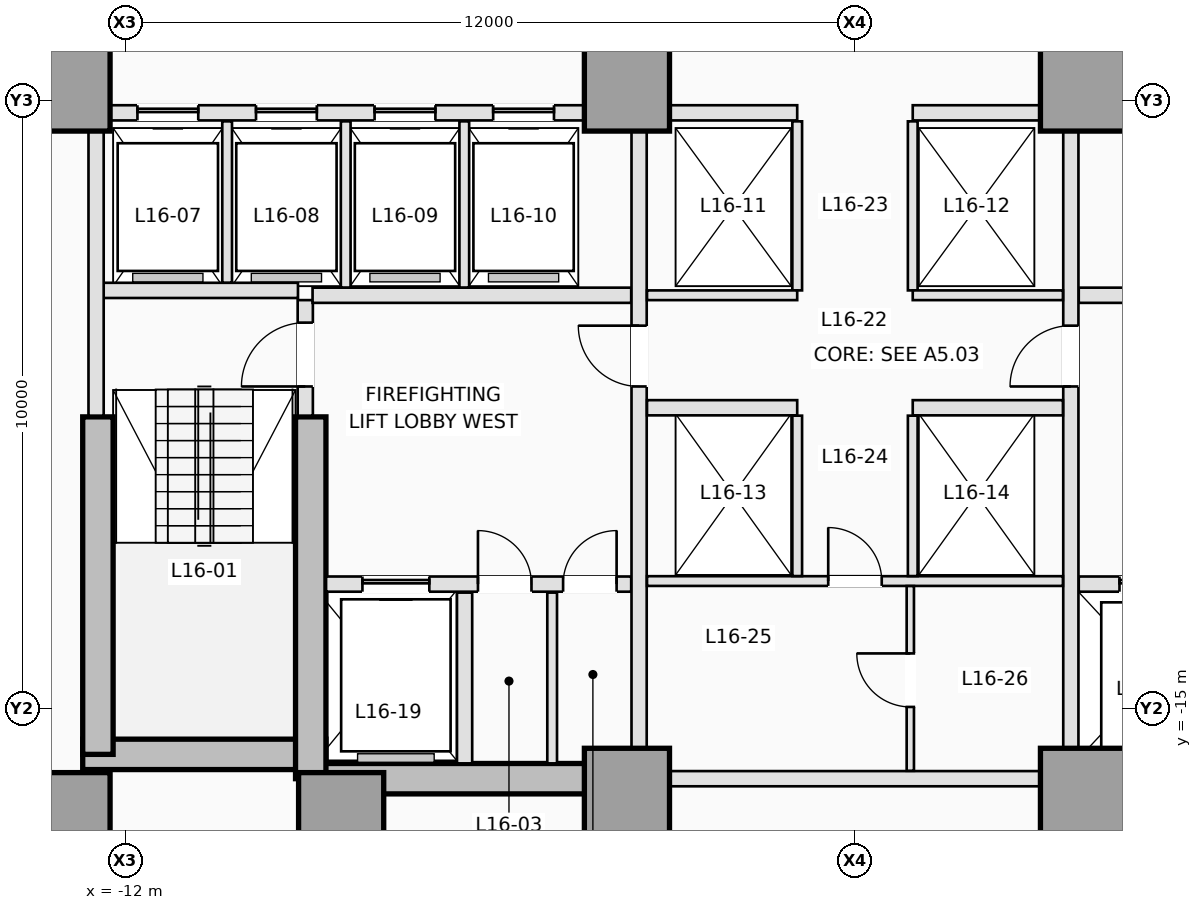
"""IFC4 building model, lengths in metres.
Left out: names, types, materials, properties, quantities, classifications, styles, units other than length and angle.
Written with IfcOpenShell. Run it as: python <this file> out.ifc"""

import sys

from ifc_helpers import new_model, si_unit, direction, frame, frame_2d, origin, origin_2d, place, context, subcontext, project, spatial, rectangle, extrude, element, fill, save


model = new_model("IFC4")
c1 = context("Model", 3, precision=1e-05, world=origin(), true_north=direction((0.0, 1.0)))
c2 = subcontext(c1, "Body", "Model", "MODEL_VIEW")
j1 = project(units=[si_unit("LENGTHUNIT", "METRE"), si_unit("PLANEANGLEUNIT", "RADIAN")], contexts=[c1])
p1 = place(None, origin())
s1 = spatial("IfcSite", under=j1, at=p1, CompositionType="ELEMENT")
p2 = place(p1, origin())
s2 = spatial("IfcBuilding", under=s1, at=p2, CompositionType="ELEMENT")
p3 = place(p2, frame((0.0, 0.0, 62.6)))
s3 = spatial("IfcBuildingStorey", under=s2, at=p3, CompositionType="ELEMENT", Elevation=62.6)
p4 = place(p3, frame((-12.7, -15.75, 0.0), z_axis=(0.0, 0.0, 1.0), x_axis=(1.0, 0.0, 0.0)))
e1 = element("IfcWall", 1, at=p4, inside=s3, PredefinedType="SHEAR", context=c2, shape_type="SweptSolid", body=[
    extrude(rectangle(XDim=4.0, YDim=0.5, at=frame_2d((2.0, 0.0))), origin(), (0.0, 0.0, 1.0), 3.5),
])
for number, where, z_axis, x_axis in (
    (2, (-8.95, -16.15, 0.0), (0.0, 0.0, 1.0), (1.0, 0.0, 0.0)),
    (3, (3.75, -16.15, 0.0), (0.0, 0.0, 1.0), (1.0, 0.0, 0.0)),
):
    element("IfcWall", number, at=place(p3, frame(where, z_axis=z_axis, x_axis=x_axis)), inside=s3, PredefinedType="SHEAR", context=c2, shape_type="SweptSolid", body=[
        extrude(rectangle(XDim=5.2, YDim=0.5, at=frame_2d((2.6, 0.0))), origin(), (0.0, 0.0, 1.0), 3.5),
    ])
p5 = place(p3, frame((-12.45, -15.75, 0.0), z_axis=(0.0, 0.0, 1.0), x_axis=(0.0, 1.0, 0.0)))
e4 = element("IfcWall", 4, at=p5, inside=s3, PredefinedType="SHEAR", context=c2, shape_type="SweptSolid", body=[
    extrude(rectangle(XDim=5.55, YDim=0.5, at=frame_2d((2.775, 0.0))), origin(), (0.0, 0.0, 1.0), 3.5),
])
p6 = place(p3, frame((-8.95, -16.15, 0.0), z_axis=(0.0, 0.0, 1.0), x_axis=(0.0, 1.0, 0.0)))
e5 = element("IfcWall", 5, at=p6, inside=s3, PredefinedType="SHEAR", context=c2, shape_type="SweptSolid", body=[
    extrude(rectangle(XDim=5.95, YDim=0.5, at=frame_2d((2.975, 0.0))), origin(), (0.0, 0.0, 1.0), 3.5),
])
for number, where, z_axis, x_axis in (
    (6, (-12.95, -16.75, 0.0), (0.0, 0.0, 1.0), (1.0, 0.0, 0.0)),
    (7, (-8.45, -16.75, 0.0), (0.0, 0.0, 1.0), (1.0, 0.0, 0.0)),
    (8, (-3.75, -16.35, 0.0), (0.0, 0.0, 1.0), (1.0, 0.0, 0.0)),
    (9, (3.75, -16.35, 0.0), (0.0, 0.0, 1.0), (1.0, 0.0, 0.0)),
    (10, (-12.95, -4.8, 0.0), (0.0, 0.0, 1.0), (1.0, 0.0, 0.0)),
    (11, (-3.75, -4.8, 0.0), (0.0, 0.0, 1.0), (1.0, 0.0, 0.0)),
    (12, (3.75, -4.8, 0.0), (0.0, 0.0, 1.0), (1.0, 0.0, 0.0)),
):
    element("IfcColumn", number, at=place(p3, frame(where, z_axis=z_axis, x_axis=x_axis)), inside=s3, PredefinedType="COLUMN", context=c2, shape_type="SweptSolid", body=[
        extrude(rectangle(XDim=1.4, YDim=1.4, at=origin_2d()), origin(), (0.0, 0.0, 1.0), 3.5),
    ])
p7 = place(p3, frame((-9.04, -10.18, 0.0), z_axis=(0.0, 0.0, 1.0), x_axis=(0.0, 1.0, 0.0)))
e13 = element("IfcWall", 13, at=p7, inside=s3, PredefinedType="PARTITIONING", context=c2, shape_type="SweptSolid", body=[
    extrude(rectangle(XDim=1.9, YDim=0.25, at=frame_2d((0.95, 0.0))), origin(), (0.0, 0.0, 1.0), 3.25),
])
p8 = place(p7, frame((0.48, 0.0, 0.0)))
e14 = element("IfcOpeningElement", 14, at=p8, cuts=e13, PredefinedType="OPENING", context=c2, shape_type="SweptSolid", body=[
    extrude(rectangle(XDim=1.05, YDim=2.15, at=frame_2d((0.525, 1.075))), frame((0.0, 0.135, 0.0), z_axis=(0.0, -1.0, 0.0), x_axis=(1.0, 0.0, 0.0)), (0.0, 0.0, 1.0), 0.27),
])
p9 = place(p3, frame((-12.38, -8.12, 0.0), z_axis=(0.0, 0.0, 1.0), x_axis=(1.0, 0.0, 0.0)))
e15 = element("IfcWall", 15, at=p9, inside=s3, PredefinedType="PARTITIONING", context=c2, shape_type="SweptSolid", body=[
    extrude(rectangle(XDim=3.22, YDim=0.25, at=frame_2d((1.61, 0.0))), origin(), (0.0, 0.0, 1.0), 3.25),
])
p10 = place(p3, frame((-12.48, -10.18, 0.0), z_axis=(0.0, 0.0, 1.0), x_axis=(0.0, 1.0, 0.0)))
e16 = element("IfcWall", 16, at=p10, inside=s3, PredefinedType="PARTITIONING", context=c2, shape_type="SweptSolid", body=[
    extrude(rectangle(XDim=4.678, YDim=0.25, at=frame_2d((2.339, 0.0))), origin(), (0.0, 0.0, 1.0), 3.25),
])
p11 = place(p3, frame((-8.698, -12.95, 0.0), z_axis=(0.0, 0.0, 1.0), x_axis=(1.0, 0.0, 0.0)))
e17 = element("IfcWall", 17, at=p11, inside=s3, PredefinedType="PARTITIONING", context=c2, shape_type="SweptSolid", body=[
    extrude(rectangle(XDim=5.018, YDim=0.25, at=frame_2d((2.509, 0.0))), origin(), (0.0, 0.0, 1.0), 3.25),
])
p12 = place(p11, frame((0.598, 0.0, 0.0)))
e18 = element("IfcOpeningElement", 18, at=p12, cuts=e17, PredefinedType="OPENING", context=c2, shape_type="SweptSolid", body=[
    extrude(rectangle(XDim=1.1, YDim=2.15, at=frame_2d((0.55, 1.075))), frame((0.0, 0.135, 0.0), z_axis=(0.0, -1.0, 0.0), x_axis=(1.0, 0.0, 0.0)), (0.0, 0.0, 1.0), 0.27),
])
p13 = place(p11, frame((2.498, 0.0, 0.0)))
e19 = element("IfcOpeningElement", 19, at=p13, cuts=e17, PredefinedType="OPENING", context=c2, shape_type="SweptSolid", body=[
    extrude(rectangle(XDim=0.88, YDim=2.1, at=frame_2d((0.44, 1.05))), frame((0.0, 0.135, 0.0), z_axis=(0.0, -1.0, 0.0), x_axis=(1.0, 0.0, 0.0)), (0.0, 0.0, 1.0), 0.27),
])
p14 = place(p11, frame((3.898, 0.0, 0.0)))
e20 = element("IfcOpeningElement", 20, at=p14, cuts=e17, PredefinedType="OPENING", context=c2, shape_type="SweptSolid", body=[
    extrude(rectangle(XDim=0.88, YDim=2.1, at=frame_2d((0.44, 1.05))), frame((0.0, 0.135, 0.0), z_axis=(0.0, -1.0, 0.0), x_axis=(1.0, 0.0, 0.0)), (0.0, 0.0, 1.0), 0.27),
])
p15 = place(p3, frame((3.68, -12.95, 0.0), z_axis=(0.0, 0.0, 1.0), x_axis=(1.0, 0.0, 0.0)))
e21 = element("IfcWall", 21, at=p15, inside=s3, PredefinedType="PARTITIONING", context=c2, shape_type="SweptSolid", body=[
    extrude(rectangle(XDim=5.018, YDim=0.25, at=frame_2d((2.509, 0.0))), origin(), (0.0, 0.0, 1.0), 3.25),
])
p16 = place(p15, frame((3.32, 0.0, 0.0)))
e22 = element("IfcOpeningElement", 22, at=p16, cuts=e21, PredefinedType="OPENING", context=c2, shape_type="SweptSolid", body=[
    extrude(rectangle(XDim=1.1, YDim=2.15, at=frame_2d((0.55, 1.075))), frame((0.0, 0.135, 0.0), z_axis=(0.0, -1.0, 0.0), x_axis=(1.0, 0.0, 0.0)), (0.0, 0.0, 1.0), 0.27),
])
p17 = place(p15, frame((0.67, 0.0, 0.0)))
e23 = element("IfcOpeningElement", 23, at=p17, cuts=e21, PredefinedType="OPENING", context=c2, shape_type="SweptSolid", body=[
    extrude(rectangle(XDim=1.2, YDim=2.15, at=frame_2d((0.6, 1.075))), frame((0.0, 0.135, 0.0), z_axis=(0.0, -1.0, 0.0), x_axis=(1.0, 0.0, 0.0)), (0.0, 0.0, 1.0), 0.27),
])
p18 = place(p3, frame((-6.42, -15.898, 0.0), z_axis=(0.0, 0.0, 1.0), x_axis=(0.0, 1.0, 0.0)))
e24 = element("IfcWall", 24, at=p18, inside=s3, PredefinedType="PARTITIONING", context=c2, shape_type="SweptSolid", body=[
    extrude(rectangle(XDim=2.808, YDim=0.25, at=frame_2d((1.404, 0.0))), origin(), (0.0, 0.0, 1.0), 3.25),
])
p19 = place(p3, frame((-4.98, -15.898, 0.0), z_axis=(0.0, 0.0, 1.0), x_axis=(0.0, 1.0, 0.0)))
e25 = element("IfcWall", 25, at=p19, inside=s3, PredefinedType="PARTITIONING", context=c2, shape_type="SweptSolid", body=[
    extrude(rectangle(XDim=2.808, YDim=0.16, at=frame_2d((1.404, 0.0))), origin(), (0.0, 0.0, 1.0), 3.25),
])
for number, where, z_axis, x_axis in (
    (26, (-8.92, -8.2, 0.0), (0.0, 0.0, 1.0), (1.0, 0.0, 0.0)),
    (27, (3.68, -8.2, 0.0), (0.0, 0.0, 1.0), (1.0, 0.0, 0.0)),
):
    element("IfcWall", number, at=place(p3, frame(where, z_axis=z_axis, x_axis=x_axis)), inside=s3, PredefinedType="PARTITIONING", context=c2, shape_type="SweptSolid", body=[
        extrude(rectangle(XDim=5.24, YDim=0.25, at=frame_2d((2.62, 0.0))), origin(), (0.0, 0.0, 1.0), 3.25),
    ])
p20 = place(p3, frame((-3.55, -15.648, 0.0), z_axis=(0.0, 0.0, 1.0), x_axis=(0.0, 1.0, 0.0)))
e28 = element("IfcWall", 28, at=p20, inside=s3, PredefinedType="PARTITIONING", context=c2, shape_type="SweptSolid", body=[
    extrude(rectangle(XDim=10.146, YDim=0.25, at=frame_2d((5.073, 0.0))), origin(), (0.0, 0.0, 1.0), 3.25),
])
p21 = place(p20, frame((5.948, 0.0, 0.0)))
e29 = element("IfcOpeningElement", 29, at=p21, cuts=e28, PredefinedType="OPENING", context=c2, shape_type="SweptSolid", body=[
    extrude(rectangle(XDim=1.0, YDim=2.15, at=frame_2d((0.5, 1.075))), frame((0.0, 0.135, 0.0), z_axis=(0.0, -1.0, 0.0), x_axis=(1.0, 0.0, 0.0)), (0.0, 0.0, 1.0), 0.27),
])
p22 = place(p3, frame((3.55, -15.648, 0.0), z_axis=(0.0, 0.0, 1.0), x_axis=(0.0, 1.0, 0.0)))
e30 = element("IfcWall", 30, at=p22, inside=s3, PredefinedType="PARTITIONING", context=c2, shape_type="SweptSolid", body=[
    extrude(rectangle(XDim=10.146, YDim=0.25, at=frame_2d((5.073, 0.0))), origin(), (0.0, 0.0, 1.0), 3.25),
])
p23 = place(p22, frame((5.948, 0.0, 0.0)))
e31 = element("IfcOpeningElement", 31, at=p23, cuts=e30, PredefinedType="OPENING", context=c2, shape_type="SweptSolid", body=[
    extrude(rectangle(XDim=1.0, YDim=2.15, at=frame_2d((0.5, 1.075))), frame((0.0, 0.135, 0.0), z_axis=(0.0, -1.0, 0.0), x_axis=(1.0, 0.0, 0.0)), (0.0, 0.0, 1.0), 0.27),
])
p24 = place(p3, frame((-12.248, -5.2, 0.0), z_axis=(0.0, 0.0, 1.0), x_axis=(1.0, 0.0, 0.0)))
e32 = element("IfcWall", 32, at=p24, inside=s3, PredefinedType="PARTITIONING", context=c2, shape_type="SweptSolid", body=[
    extrude(rectangle(XDim=7.796, YDim=0.25, at=frame_2d((3.898, 0.0))), origin(), (0.0, 0.0, 1.0), 3.25),
])
p25 = place(p24, frame((0.448, 0.0, 0.0)))
e33 = element("IfcOpeningElement", 33, at=p25, cuts=e32, PredefinedType="OPENING", context=c2, shape_type="SweptSolid", body=[
    extrude(rectangle(XDim=1.0, YDim=2.15, at=frame_2d((0.5, 1.075))), frame((0.0, 0.135, 0.0), z_axis=(0.0, -1.0, 0.0), x_axis=(1.0, 0.0, 0.0)), (0.0, 0.0, 1.0), 0.27),
])
p26 = place(p24, frame((2.398, 0.0, 0.0)))
e34 = element("IfcOpeningElement", 34, at=p26, cuts=e32, PredefinedType="OPENING", context=c2, shape_type="SweptSolid", body=[
    extrude(rectangle(XDim=1.0, YDim=2.15, at=frame_2d((0.5, 1.075))), frame((0.0, 0.135, 0.0), z_axis=(0.0, -1.0, 0.0), x_axis=(1.0, 0.0, 0.0)), (0.0, 0.0, 1.0), 0.27),
])
p27 = place(p24, frame((4.348, 0.0, 0.0)))
e35 = element("IfcOpeningElement", 35, at=p27, cuts=e32, PredefinedType="OPENING", context=c2, shape_type="SweptSolid", body=[
    extrude(rectangle(XDim=1.0, YDim=2.15, at=frame_2d((0.5, 1.075))), frame((0.0, 0.135, 0.0), z_axis=(0.0, -1.0, 0.0), x_axis=(1.0, 0.0, 0.0)), (0.0, 0.0, 1.0), 0.27),
])
p28 = place(p24, frame((6.298, 0.0, 0.0)))
e36 = element("IfcOpeningElement", 36, at=p28, cuts=e32, PredefinedType="OPENING", context=c2, shape_type="SweptSolid", body=[
    extrude(rectangle(XDim=1.0, YDim=2.15, at=frame_2d((0.5, 1.075))), frame((0.0, 0.135, 0.0), z_axis=(0.0, -1.0, 0.0), x_axis=(1.0, 0.0, 0.0)), (0.0, 0.0, 1.0), 0.27),
])
for number, where, z_axis, x_axis in (
    (37, (-3.048, -5.2, 0.0), (0.0, 0.0, 1.0), (1.0, 0.0, 0.0)),
    (38, (0.95, -5.2, 0.0), (0.0, 0.0, 1.0), (1.0, 0.0, 0.0)),
):
    element("IfcWall", number, at=place(p3, frame(where, z_axis=z_axis, x_axis=x_axis)), inside=s3, PredefinedType="PARTITIONING", context=c2, shape_type="SweptSolid", body=[
        extrude(rectangle(XDim=2.098, YDim=0.25, at=frame_2d((1.049, 0.0))), origin(), (0.0, 0.0, 1.0), 3.25),
    ])
p29 = place(p3, frame((-10.325, -7.993, 0.0), z_axis=(0.0, 0.0, 1.0), x_axis=(0.0, 1.0, 0.0)))
e39 = element("IfcWall", 39, at=p29, inside=s3, PredefinedType="PARTITIONING", context=c2, shape_type="SweptSolid", body=[
    extrude(rectangle(XDim=2.653, YDim=0.16, at=frame_2d((1.326, 0.0))), origin(), (0.0, 0.0, 1.0), 3.25),
])
for number, where, z_axis, x_axis in (
    (40, (-8.375, -8.073, 0.0), (0.0, 0.0, 1.0), (0.0, 1.0, 0.0)),
    (41, (-6.425, -8.073, 0.0), (0.0, 0.0, 1.0), (0.0, 1.0, 0.0)),
):
    element("IfcWall", number, at=place(p3, frame(where, z_axis=z_axis, x_axis=x_axis)), inside=s3, PredefinedType="PARTITIONING", context=c2, shape_type="SweptSolid", body=[
        extrude(rectangle(XDim=2.733, YDim=0.16, at=frame_2d((1.366, 0.0))), origin(), (0.0, 0.0, 1.0), 3.25),
    ])
p30 = place(p3, frame((-3.048, -16.15, 0.0), z_axis=(0.0, 0.0, 1.0), x_axis=(1.0, 0.0, 0.0)))
e42 = element("IfcWall", 42, at=p30, inside=s3, PredefinedType="PARTITIONING", context=c2, shape_type="SweptSolid", body=[
    extrude(rectangle(XDim=6.096, YDim=0.25, at=frame_2d((3.048, 0.0))), origin(), (0.0, 0.0, 1.0), 2.3),
])
for number, where, z_axis, x_axis in (
    (43, (-0.95, -8.12, 0.0), (0.0, 0.0, 1.0), (0.0, 1.0, 0.0)),
    (44, (0.95, -8.12, 0.0), (0.0, 0.0, 1.0), (0.0, 1.0, 0.0)),
):
    element("IfcWall", number, at=place(p3, frame(where, z_axis=z_axis, x_axis=x_axis)), inside=s3, PredefinedType="PARTITIONING", context=c2, shape_type="SweptSolid", body=[
        extrude(rectangle(XDim=2.78, YDim=0.16, at=frame_2d((1.39, 0.0))), origin(), (0.0, 0.0, 1.0), 3.25),
    ])
for number, where, z_axis, x_axis in (
    (45, (-3.42, -8.2, 0.0), (0.0, 0.0, 1.0), (1.0, 0.0, 0.0)),
    (46, (0.95, -8.2, 0.0), (0.0, 0.0, 1.0), (1.0, 0.0, 0.0)),
):
    element("IfcWall", number, at=place(p3, frame(where, z_axis=z_axis, x_axis=x_axis)), inside=s3, PredefinedType="PARTITIONING", context=c2, shape_type="SweptSolid", body=[
        extrude(rectangle(XDim=2.47, YDim=0.16, at=frame_2d((1.235, 0.0))), origin(), (0.0, 0.0, 1.0), 3.25),
    ])
for number, where, z_axis, x_axis in (
    (47, (-3.42, -10.05, 0.0), (0.0, 0.0, 1.0), (1.0, 0.0, 0.0)),
    (48, (0.95, -10.05, 0.0), (0.0, 0.0, 1.0), (1.0, 0.0, 0.0)),
):
    element("IfcWall", number, at=place(p3, frame(where, z_axis=z_axis, x_axis=x_axis)), inside=s3, PredefinedType="PARTITIONING", context=c2, shape_type="SweptSolid", body=[
        extrude(rectangle(XDim=2.47, YDim=0.25, at=frame_2d((1.235, 0.0))), origin(), (0.0, 0.0, 1.0), 3.25),
    ])
p31 = place(p3, frame((-3.42, -12.9, 0.0), z_axis=(0.0, 0.0, 1.0), x_axis=(1.0, 0.0, 0.0)))
e49 = element("IfcWall", 49, at=p31, inside=s3, PredefinedType="PARTITIONING", context=c2, shape_type="SweptSolid", body=[
    extrude(rectangle(XDim=6.84, YDim=0.16, at=frame_2d((3.42, 0.0))), origin(), (0.0, 0.0, 1.0), 3.25),
])
p32 = place(p31, frame((2.98, 0.0, 0.0)))
e50 = element("IfcOpeningElement", 50, at=p32, cuts=e49, PredefinedType="OPENING", context=c2, shape_type="SweptSolid", body=[
    extrude(rectangle(XDim=0.88, YDim=2.12, at=frame_2d((0.44, 1.06))), frame((0.0, 0.09, 0.0), z_axis=(0.0, -1.0, 0.0), x_axis=(1.0, 0.0, 0.0)), (0.0, 0.0, 1.0), 0.18),
])
for number, where, z_axis, x_axis in (
    (51, (-0.95, -12.818, 0.0), (0.0, 0.0, 1.0), (0.0, 1.0, 0.0)),
    (52, (0.95, -12.818, 0.0), (0.0, 0.0, 1.0), (0.0, 1.0, 0.0)),
):
    element("IfcWall", number, at=place(p3, frame(where, z_axis=z_axis, x_axis=x_axis)), inside=s3, PredefinedType="PARTITIONING", context=c2, shape_type="SweptSolid", body=[
        extrude(rectangle(XDim=2.638, YDim=0.16, at=frame_2d((1.319, 0.0))), origin(), (0.0, 0.0, 1.0), 3.25),
    ])
p33 = place(p3, frame((0.91, -16.02, 0.0), z_axis=(0.0, 0.0, 1.0), x_axis=(0.0, 1.0, 0.0)))
e53 = element("IfcWall", 53, at=p33, inside=s3, PredefinedType="PARTITIONING", context=c2, shape_type="SweptSolid", body=[
    extrude(rectangle(XDim=3.038, YDim=0.12, at=frame_2d((1.519, 0.0))), origin(), (0.0, 0.0, 1.0), 3.25),
])
p34 = place(p33, frame((1.05, 0.0, 0.0)))
e54 = element("IfcOpeningElement", 54, at=p34, cuts=e53, PredefinedType="OPENING", context=c2, shape_type="SweptSolid", body=[
    extrude(rectangle(XDim=0.88, YDim=2.12, at=frame_2d((0.44, 1.06))), frame((0.0, 0.07, 0.0), z_axis=(0.0, -1.0, 0.0), x_axis=(1.0, 0.0, 0.0)), (0.0, 0.0, 1.0), 0.14),
])
p35 = place(p25, origin())
e55 = element("IfcDoor", 55, at=p35, inside=s3, OperationType="SLIDING_TO_LEFT", PredefinedType="DOOR", context=c2, shape_type="SweptSolid", body=[
    extrude(rectangle(XDim=1.0, YDim=2.15, at=frame_2d((0.5, 1.075))), frame((0.0, 0.025, 0.0), z_axis=(0.0, -1.0, 0.0), x_axis=(1.0, 0.0, 0.0)), (0.0, 0.0, 1.0), 0.05),
])
fill(e33, e55)
p36 = place(p26, origin())
e56 = element("IfcDoor", 56, at=p36, inside=s3, OperationType="SLIDING_TO_LEFT", PredefinedType="DOOR", context=c2, shape_type="SweptSolid", body=[
    extrude(rectangle(XDim=1.0, YDim=2.15, at=frame_2d((0.5, 1.075))), frame((0.0, 0.025, 0.0), z_axis=(0.0, -1.0, 0.0), x_axis=(1.0, 0.0, 0.0)), (0.0, 0.0, 1.0), 0.05),
])
fill(e34, e56)
p37 = place(p27, origin())
e57 = element("IfcDoor", 57, at=p37, inside=s3, OperationType="SLIDING_TO_LEFT", PredefinedType="DOOR", context=c2, shape_type="SweptSolid", body=[
    extrude(rectangle(XDim=1.0, YDim=2.15, at=frame_2d((0.5, 1.075))), frame((0.0, 0.025, 0.0), z_axis=(0.0, -1.0, 0.0), x_axis=(1.0, 0.0, 0.0)), (0.0, 0.0, 1.0), 0.05),
])
fill(e35, e57)
p38 = place(p28, origin())
e58 = element("IfcDoor", 58, at=p38, inside=s3, OperationType="SLIDING_TO_LEFT", PredefinedType="DOOR", context=c2, shape_type="SweptSolid", body=[
    extrude(rectangle(XDim=1.0, YDim=2.15, at=frame_2d((0.5, 1.075))), frame((0.0, 0.025, 0.0), z_axis=(0.0, -1.0, 0.0), x_axis=(1.0, 0.0, 0.0)), (0.0, 0.0, 1.0), 0.05),
])
fill(e36, e58)
p39 = place(p12, origin())
e59 = element("IfcDoor", 59, at=p39, inside=s3, OperationType="SLIDING_TO_LEFT", PredefinedType="DOOR", context=c2, shape_type="SweptSolid", body=[
    extrude(rectangle(XDim=1.1, YDim=2.15, at=frame_2d((0.55, 1.075))), frame((0.0, 0.025, 0.0), z_axis=(0.0, -1.0, 0.0), x_axis=(1.0, 0.0, 0.0)), (0.0, 0.0, 1.0), 0.05),
])
fill(e18, e59)
p40 = place(p17, origin())
e60 = element("IfcDoor", 60, at=p40, inside=s3, OperationType="SLIDING_TO_LEFT", PredefinedType="DOOR", context=c2, shape_type="SweptSolid", body=[
    extrude(rectangle(XDim=1.2, YDim=2.15, at=frame_2d((0.6, 1.075))), frame((0.0, 0.025, 0.0), z_axis=(0.0, -1.0, 0.0), x_axis=(1.0, 0.0, 0.0)), (0.0, 0.0, 1.0), 0.05),
])
fill(e23, e60)
p41 = place(p8, origin())
e61 = element("IfcDoor", 61, at=p41, inside=s3, OperationType="SINGLE_SWING_LEFT", PredefinedType="DOOR", context=c2, shape_type="SweptSolid", body=[
    extrude(rectangle(XDim=1.05, YDim=2.15, at=frame_2d((0.525, 1.075))), frame((0.0, 0.025, 0.0), z_axis=(0.0, -1.0, 0.0), x_axis=(1.0, 0.0, 0.0)), (0.0, 0.0, 1.0), 0.05),
])
fill(e14, e61)
p42 = place(p13, origin())
e62 = element("IfcDoor", 62, at=p42, inside=s3, OperationType="SINGLE_SWING_LEFT", PredefinedType="TRAPDOOR", context=c2, shape_type="SweptSolid", body=[
    extrude(rectangle(XDim=0.88, YDim=2.1, at=frame_2d((0.44, 1.05))), frame((0.0, 0.025, 0.0), z_axis=(0.0, -1.0, 0.0), x_axis=(1.0, 0.0, 0.0)), (0.0, 0.0, 1.0), 0.05),
])
fill(e19, e62)
p43 = place(p14, origin())
e63 = element("IfcDoor", 63, at=p43, inside=s3, OperationType="SINGLE_SWING_RIGHT", PredefinedType="TRAPDOOR", context=c2, shape_type="SweptSolid", body=[
    extrude(rectangle(XDim=0.88, YDim=2.1, at=frame_2d((0.44, 1.05))), frame((0.0, 0.025, 0.0), z_axis=(0.0, -1.0, 0.0), x_axis=(1.0, 0.0, 0.0)), (0.0, 0.0, 1.0), 0.05),
])
fill(e20, e63)
p44 = place(p21, origin())
e64 = element("IfcDoor", 64, at=p44, inside=s3, OperationType="SINGLE_SWING_RIGHT", PredefinedType="DOOR", context=c2, shape_type="SweptSolid", body=[
    extrude(rectangle(XDim=1.0, YDim=2.15, at=frame_2d((0.5, 1.075))), frame((0.0, 0.025, 0.0), z_axis=(0.0, -1.0, 0.0), x_axis=(1.0, 0.0, 0.0)), (0.0, 0.0, 1.0), 0.05),
])
fill(e29, e64)
p45 = place(p23, origin())
e65 = element("IfcDoor", 65, at=p45, inside=s3, OperationType="SINGLE_SWING_LEFT", PredefinedType="DOOR", context=c2, shape_type="SweptSolid", body=[
    extrude(rectangle(XDim=1.0, YDim=2.15, at=frame_2d((0.5, 1.075))), frame((0.0, 0.025, 0.0), z_axis=(0.0, -1.0, 0.0), x_axis=(1.0, 0.0, 0.0)), (0.0, 0.0, 1.0), 0.05),
])
fill(e31, e65)
p46 = place(p32, origin())
e66 = element("IfcDoor", 66, at=p46, inside=s3, OperationType="SINGLE_SWING_LEFT", PredefinedType="DOOR", context=c2, shape_type="SweptSolid", body=[
    extrude(rectangle(XDim=0.88, YDim=2.12, at=frame_2d((0.44, 1.06))), frame((0.0, 0.025, 0.0), z_axis=(0.0, -1.0, 0.0), x_axis=(1.0, 0.0, 0.0)), (0.0, 0.0, 1.0), 0.05),
])
fill(e50, e66)
p47 = place(p34, origin())
e67 = element("IfcDoor", 67, at=p47, inside=s3, OperationType="SINGLE_SWING_RIGHT", PredefinedType="DOOR", context=c2, shape_type="SweptSolid", body=[
    extrude(rectangle(XDim=0.88, YDim=2.12, at=frame_2d((0.44, 1.06))), frame((0.0, 0.025, 0.0), z_axis=(0.0, -1.0, 0.0), x_axis=(1.0, 0.0, 0.0)), (0.0, 0.0, 1.0), 0.05),
])
fill(e54, e67)
save(model, sys.argv[1])
